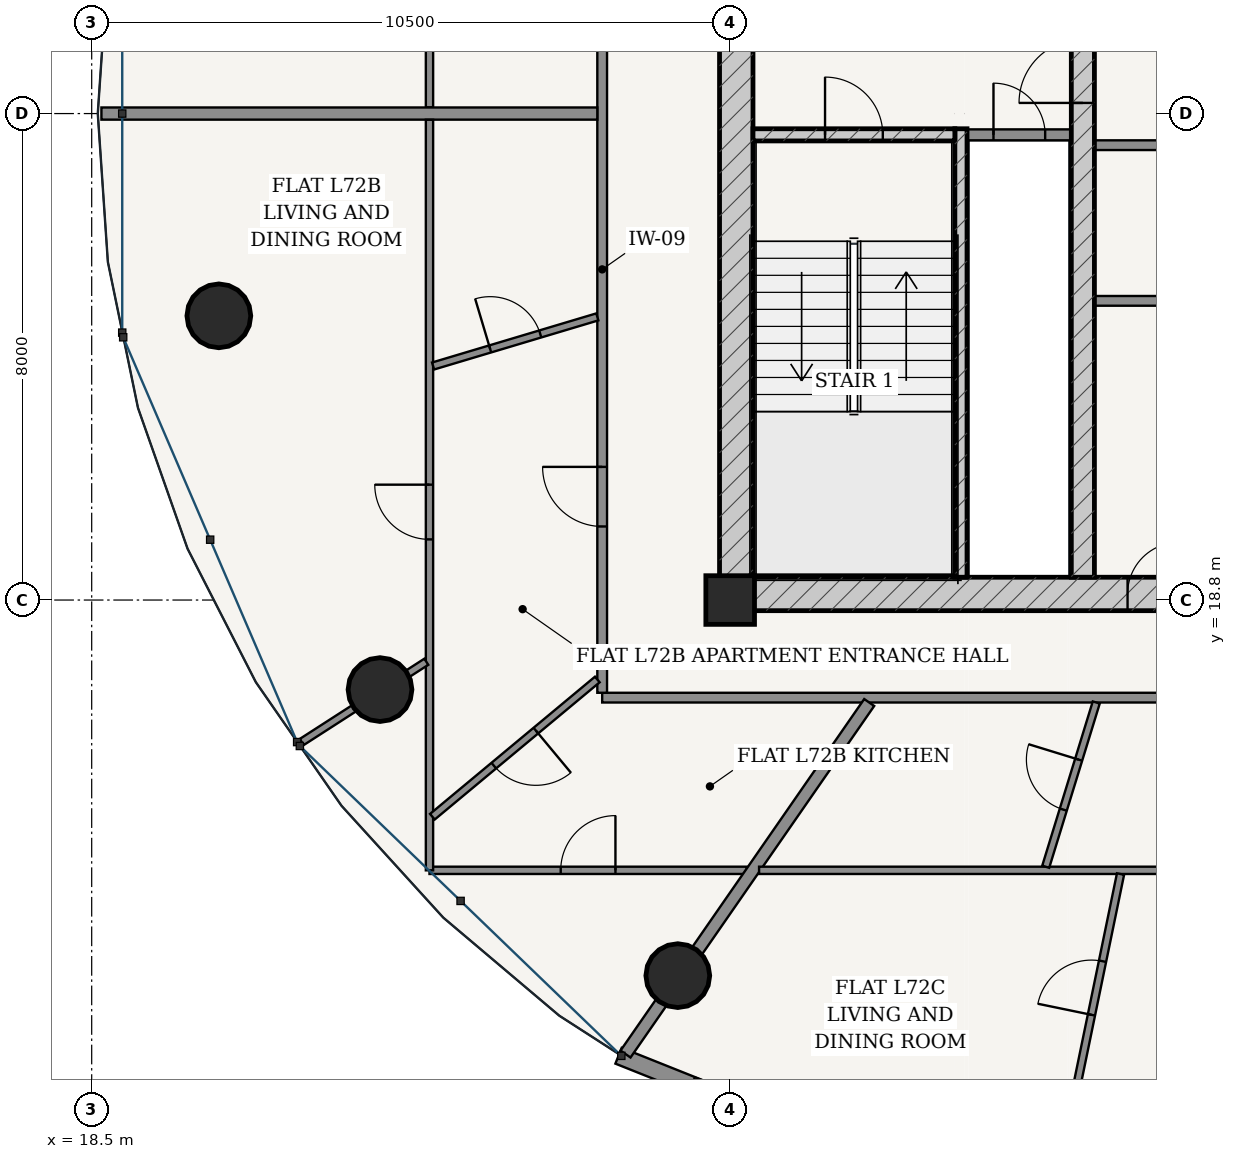
"""IFC4 building model, lengths in metres.
Left out: names, types, materials, properties, quantities, classifications, styles, units other than length and angle.
Written with IfcOpenShell. Run it as: python <this file> out.ifc"""

import sys

from ifc_helpers import new_model, si_unit, direction, frame, frame_2d, origin, origin_2d, place, context, subcontext, project, spatial, rectangle, hollow_circle, extrude, source, transform, mapped, element, fill, save


model = new_model("IFC4")
c1 = context("Model", 3, precision=1e-05, world=origin(), true_north=direction((-0.2419218956, 0.970295726276)))
c2 = subcontext(c1, "Body", "Model", "MODEL_VIEW")
j1 = project(units=[si_unit("LENGTHUNIT", "METRE"), si_unit("PLANEANGLEUNIT", "RADIAN")], contexts=[c1])
p1 = place(None, origin())
s1 = spatial("IfcSite", under=j1, at=p1, CompositionType="ELEMENT")
p2 = place(p1, origin())
s2 = spatial("IfcBuilding", under=s1, at=p2, CompositionType="ELEMENT")
p3 = place(p2, frame((0.0, 0.0, 274.45)))
s3 = spatial("IfcBuildingStorey", under=s2, at=p3, CompositionType="ELEMENT", Elevation=274.45)
p4 = place(p3, frame((29.0, 18.8, 0.0), z_axis=(0.0, 0.0, 1.0), x_axis=(1.0, 0.0, 0.0)))
e1 = element("IfcColumn", 1, at=p4, inside=s3, PredefinedType="COLUMN", context=c2, shape_type="SweptSolid", body=[
    extrude(rectangle(XDim=0.8, YDim=0.8, at=origin_2d()), origin(), (0.0, 0.0, 1.0), 3.75),
])
p5 = place(p3, frame((28.825, 18.9, 0.0), z_axis=(0.0, 0.0, 1.0), x_axis=(1.0, 0.0, 0.0)))
e2 = element("IfcWall", 2, at=p5, inside=s3, PredefinedType="SHEAR", context=c2, shape_type="SweptSolid", body=[
    extrude(rectangle(XDim=18.35, YDim=0.55, at=frame_2d((9.175, 0.0))), origin(), (0.0, 0.0, 1.0), 3.49),
])
p6 = place(p5, frame((6.71, 0.0, 0.0)))
e3 = element("IfcOpeningElement", 3, at=p6, cuts=e2, PredefinedType="OPENING", context=c2, shape_type="SweptSolid", body=[
    extrude(rectangle(XDim=0.85, YDim=2.1, at=frame_2d((0.425, 1.05))), frame((0.0, 0.285, 0.0), z_axis=(0.0, -1.0, 0.0), x_axis=(1.0, 0.0, 0.0)), (0.0, 0.0, 1.0), 0.57),
])
p7 = place(p5, frame((8.75, 0.0, 0.0)))
e4 = element("IfcOpeningElement", 4, at=p7, cuts=e2, PredefinedType="OPENING", context=c2, shape_type="SweptSolid", body=[
    extrude(rectangle(XDim=0.85, YDim=2.1, at=frame_2d((0.425, 1.05))), frame((0.0, 0.285, 0.0), z_axis=(0.0, -1.0, 0.0), x_axis=(1.0, 0.0, 0.0)), (0.0, 0.0, 1.0), 0.57),
])
p8 = place(p5, frame((10.79, 0.0, 0.0)))
e5 = element("IfcOpeningElement", 5, at=p8, cuts=e2, PredefinedType="OPENING", context=c2, shape_type="SweptSolid", body=[
    extrude(rectangle(XDim=0.85, YDim=2.1, at=frame_2d((0.425, 1.05))), frame((0.0, 0.285, 0.0), z_axis=(0.0, -1.0, 0.0), x_axis=(1.0, 0.0, 0.0)), (0.0, 0.0, 1.0), 0.57),
])
p9 = place(p3, frame((29.1, 19.175, 0.0), z_axis=(0.0, 0.0, 1.0), x_axis=(0.0, 1.0, 0.0)))
e6 = element("IfcWall", 6, at=p9, inside=s3, PredefinedType="SHEAR", context=c2, shape_type="SweptSolid", body=[
    extrude(rectangle(XDim=15.25, YDim=0.55, at=frame_2d((7.625, 0.0))), origin(), (0.0, 0.0, 1.0), 3.49),
])
p10 = place(p9, frame((9.875, 0.0, 0.0)))
e7 = element("IfcOpeningElement", 7, at=p10, cuts=e6, PredefinedType="OPENING", context=c2, shape_type="SweptSolid", body=[
    extrude(rectangle(XDim=1.5, YDim=2.2, at=frame_2d((0.75, 1.1))), frame((0.0, 0.285, 0.0), z_axis=(0.0, -1.0, 0.0), x_axis=(1.0, 0.0, 0.0)), (0.0, 0.0, 1.0), 0.57),
])
p11 = place(p3, frame((32.795, 19.175, 0.0), z_axis=(0.0, 0.0, 1.0), x_axis=(0.0, 1.0, 0.0)))
e8 = element("IfcWall", 8, at=p11, inside=s3, PredefinedType="SOLIDWALL", context=c2, shape_type="SweptSolid", body=[
    extrude(rectangle(XDim=7.375, YDim=0.2, at=frame_2d((3.688, 0.0))), origin(), (0.0, 0.0, 1.0), 3.49),
])
p12 = place(p3, frame((29.375, 26.45, 0.0), z_axis=(0.0, 0.0, 1.0), x_axis=(1.0, 0.0, 0.0)))
e9 = element("IfcWall", 9, at=p12, inside=s3, PredefinedType="SOLIDWALL", context=c2, shape_type="SweptSolid", body=[
    extrude(rectangle(XDim=3.32, YDim=0.2, at=frame_2d((1.66, 0.0))), origin(), (0.0, 0.0, 1.0), 3.49),
])
p13 = place(p12, frame((1.185, 0.0, 0.0)))
e10 = element("IfcOpeningElement", 10, at=p13, cuts=e9, PredefinedType="OPENING", context=c2, shape_type="SweptSolid", body=[
    extrude(rectangle(XDim=0.95, YDim=2.15, at=frame_2d((0.475, 1.075))), frame((0.0, 0.11, 0.0), z_axis=(0.0, -1.0, 0.0), x_axis=(1.0, 0.0, 0.0)), (0.0, 0.0, 1.0), 0.22),
])
p14 = place(p3, frame((34.8, 19.175, 0.0), z_axis=(0.0, 0.0, 1.0), x_axis=(0.0, 1.0, 0.0)))
e11 = element("IfcWall", 11, at=p14, inside=s3, PredefinedType="SHEAR", context=c2, shape_type="SweptSolid", body=[
    extrude(rectangle(XDim=15.25, YDim=0.38, at=frame_2d((7.625, 0.0))), origin(), (0.0, 0.0, 1.0), 3.49),
])
p15 = place(p14, frame((7.8, 0.0, 0.0)))
e12 = element("IfcOpeningElement", 12, at=p15, cuts=e11, PredefinedType="OPENING", context=c2, shape_type="SweptSolid", body=[
    extrude(rectangle(XDim=1.05, YDim=2.15, at=frame_2d((0.525, 1.075))), frame((0.0, 0.2, 0.0), z_axis=(0.0, -1.0, 0.0), x_axis=(1.0, 0.0, 0.0)), (0.0, 0.0, 1.0), 0.4),
])
for number, where, z_axis, x_axis in (
    (13, (20.591, 23.474, 0.0), (0.0, 0.0, 1.0), (1.0, 0.0, 0.0)),
    (14, (23.241, 17.328, 0.0), (0.0, 0.0, 1.0), (1.0, 0.0, 0.0)),
    (15, (28.139, 12.624, 0.0), (0.0, 0.0, 1.0), (1.0, 0.0, 0.0)),
):
    element("IfcColumn", number, at=place(p3, frame(where, z_axis=z_axis, x_axis=x_axis)), inside=s3, PredefinedType="COLUMN", context=c2, shape_type="SweptSolid", body=[
        extrude(hollow_circle(Radius=0.525, WallThickness=0.035, at=origin_2d()), origin(), (0.0, 0.0, 1.0), 3.75),
    ])
p16 = place(p3, frame((27.164, 11.306, 0.0), z_axis=(0.0, 0.0, 1.0), x_axis=(0.92871332341, -0.370798547626, 0.0)))
e16 = element("IfcWall", 16, at=p16, inside=s3, PredefinedType="SOLIDWALL", context=c2, shape_type="SweptSolid", body=[
    extrude(rectangle(XDim=7.678, YDim=0.28, at=frame_2d((3.839, 0.0))), origin(), (0.0, 0.0, 1.0), 3.49),
])
p17 = place(p16, frame((1.298, 0.0, 0.85)))
e17 = element("IfcOpeningElement", 17, at=p17, cuts=e16, PredefinedType="OPENING", context=c2, shape_type="SweptSolid", body=[
    extrude(rectangle(XDim=1.55, YDim=1.95, at=frame_2d((0.775, 0.975))), frame((0.0, 0.15, 0.0), z_axis=(0.0, -1.0, 0.0), x_axis=(1.0, 0.0, 0.0)), (0.0, 0.0, 1.0), 0.3),
])
p18 = place(p16, frame((4.83, 0.0, 0.85)))
e18 = element("IfcOpeningElement", 18, at=p18, cuts=e16, PredefinedType="OPENING", context=c2, shape_type="SweptSolid", body=[
    extrude(rectangle(XDim=1.55, YDim=1.95, at=frame_2d((0.775, 0.975))), frame((0.0, 0.15, 0.0), z_axis=(0.0, -1.0, 0.0), x_axis=(1.0, 0.0, 0.0)), (0.0, 0.0, 1.0), 0.3),
])
p19 = place(p3, frame((32.9, 26.45, 0.0), z_axis=(0.0, 0.0, 1.0), x_axis=(1.0, 0.0, 0.0)))
e19 = element("IfcWall", 19, at=p19, inside=s3, PredefinedType="PARTITIONING", context=c2, shape_type="SweptSolid", body=[
    extrude(rectangle(XDim=1.71, YDim=0.18, at=frame_2d((0.855, 0.0))), origin(), (0.0, 0.0, 1.0), 3.49),
])
p20 = place(p19, frame((0.43, 0.0, 0.0)))
e20 = element("IfcOpeningElement", 20, at=p20, cuts=e19, PredefinedType="OPENING", context=c2, shape_type="SweptSolid", body=[
    extrude(rectangle(XDim=0.85, YDim=2.1, at=frame_2d((0.425, 1.05))), frame((0.0, 0.1, 0.0), z_axis=(0.0, -1.0, 0.0), x_axis=(1.0, 0.0, 0.0)), (0.0, 0.0, 1.0), 0.2),
])
p21 = place(p3, frame((34.99, 26.28, 0.0), z_axis=(0.0, 0.0, 1.0), x_axis=(1.0, 0.0, 0.0)))
e21 = element("IfcWall", 21, at=p21, inside=s3, PredefinedType="PARTITIONING", context=c2, shape_type="SweptSolid", body=[
    extrude(rectangle(XDim=6.02, YDim=0.16, at=frame_2d((3.01, 0.0))), origin(), (0.0, 0.0, 1.0), 3.49),
])
p22 = place(p21, frame((1.045, 0.0, 0.0)))
e22 = element("IfcOpeningElement", 22, at=p22, cuts=e21, PredefinedType="OPENING", context=c2, shape_type="SweptSolid", body=[
    extrude(rectangle(XDim=0.85, YDim=2.1, at=frame_2d((0.425, 1.05))), frame((0.0, 0.09, 0.0), z_axis=(0.0, -1.0, 0.0), x_axis=(1.0, 0.0, 0.0)), (0.0, 0.0, 1.0), 0.18),
])
p23 = place(p21, frame((3.215, 0.0, 0.0)))
e23 = element("IfcOpeningElement", 23, at=p23, cuts=e21, PredefinedType="OPENING", context=c2, shape_type="SweptSolid", body=[
    extrude(rectangle(XDim=1.1, YDim=2.2, at=frame_2d((0.55, 1.1))), frame((0.0, 0.09, 0.0), z_axis=(0.0, -1.0, 0.0), x_axis=(1.0, 0.0, 0.0)), (0.0, 0.0, 1.0), 0.18),
])
p24 = place(p21, frame((4.695, 0.0, 0.0)))
e24 = element("IfcOpeningElement", 24, at=p24, cuts=e21, PredefinedType="OPENING", context=c2, shape_type="SweptSolid", body=[
    extrude(rectangle(XDim=1.1, YDim=2.2, at=frame_2d((0.55, 1.1))), frame((0.0, 0.09, 0.0), z_axis=(0.0, -1.0, 0.0), x_axis=(1.0, 0.0, 0.0)), (0.0, 0.0, 1.0), 0.18),
])
p25 = place(p3, frame((34.99, 23.72, 0.0), z_axis=(0.0, 0.0, 1.0), x_axis=(1.0, 0.0, 0.0)))
e25 = element("IfcWall", 25, at=p25, inside=s3, PredefinedType="PARTITIONING", context=c2, shape_type="SweptSolid", body=[
    extrude(rectangle(XDim=6.02, YDim=0.16, at=frame_2d((3.01, 0.0))), origin(), (0.0, 0.0, 1.0), 3.49),
])
p26 = place(p3, frame((26.895, 17.195, 0.0), z_axis=(0.0, 0.0, 1.0), x_axis=(1.0, 0.0, 0.0)))
e26 = element("IfcWall", 26, at=p26, inside=s3, PredefinedType="PARTITIONING", context=c2, shape_type="SweptSolid", body=[
    extrude(rectangle(XDim=22.21, YDim=0.16, at=frame_2d((11.105, 0.0))), origin(), (0.0, 0.0, 1.0), 3.015),
])
p27 = place(p26, frame((9.746, 0.0, 0.0)))
e27 = element("IfcOpeningElement", 27, at=p27, cuts=e26, PredefinedType="OPENING", context=c2, shape_type="SweptSolid", body=[
    extrude(rectangle(XDim=0.98, YDim=2.2, at=frame_2d((0.49, 1.1))), frame((0.0, 0.09, 0.0), z_axis=(0.0, -1.0, 0.0), x_axis=(1.0, 0.0, 0.0)), (0.0, 0.0, 1.0), 0.18),
])
p28 = place(p26, frame((20.864, 0.0, 0.0)))
e28 = element("IfcOpeningElement", 28, at=p28, cuts=e26, PredefinedType="OPENING", context=c2, shape_type="SweptSolid", body=[
    extrude(rectangle(XDim=0.98, YDim=2.2, at=frame_2d((0.49, 1.1))), frame((0.0, 0.09, 0.0), z_axis=(0.0, -1.0, 0.0), x_axis=(1.0, 0.0, 0.0)), (0.0, 0.0, 1.0), 0.18),
])
p29 = place(p3, frame((26.895, 17.275, 0.0), z_axis=(0.0, 0.0, 1.0), x_axis=(0.0, 1.0, 0.0)))
e29 = element("IfcWall", 29, at=p29, inside=s3, PredefinedType="PARTITIONING", context=c2, shape_type="SweptSolid", body=[
    extrude(rectangle(XDim=13.925, YDim=0.16, at=frame_2d((6.962, 0.0))), origin(), (0.0, 0.0, 1.0), 3.015),
])
p30 = place(p29, frame((2.735, 0.0, 0.0)))
e30 = element("IfcOpeningElement", 30, at=p30, cuts=e29, PredefinedType="OPENING", context=c2, shape_type="SweptSolid", body=[
    extrude(rectangle(XDim=0.98, YDim=2.2, at=frame_2d((0.49, 1.1))), frame((0.0, 0.09, 0.0), z_axis=(0.0, -1.0, 0.0), x_axis=(1.0, 0.0, 0.0)), (0.0, 0.0, 1.0), 0.18),
])
p31 = place(p3, frame((24.055, 26.902, 0.0), z_axis=(0.0, 0.0, 1.0), x_axis=(0.0, 1.0, 0.0)))
e31 = element("IfcWall", 31, at=p31, inside=s3, PredefinedType="PARTITIONING", context=c2, shape_type="SweptSolid", body=[
    extrude(rectangle(XDim=7.218, YDim=0.12, at=frame_2d((3.609, 0.0))), origin(), (0.0, 0.0, 1.0), 3.015),
])
p32 = place(p3, frame((26.815, 26.8, 0.0), z_axis=(0.0, 0.0, 1.0), x_axis=(-1.0, 0.0, 0.0)))
e32 = element("IfcWall", 32, at=p32, inside=s3, PredefinedType="PARTITIONING", context=c2, shape_type="SweptSolid", body=[
    extrude(rectangle(XDim=8.155, YDim=0.2, at=frame_2d((4.078, 0.0))), origin(), (0.0, 0.0, 1.0), 3.121),
])
p33 = place(p3, frame((29.271, 14.355, 0.0), z_axis=(0.0, 0.0, 1.0), x_axis=(-1.0, 0.0, 0.0)))
e33 = element("IfcWall", 33, at=p33, inside=s3, PredefinedType="PARTITIONING", context=c2, shape_type="SweptSolid", body=[
    extrude(rectangle(XDim=5.216, YDim=0.12, at=frame_2d((2.608, 0.0))), origin(), (0.0, 0.0, 1.0), 3.015),
])
p34 = place(p33, frame((2.158, 0.0, 0.0)))
e34 = element("IfcOpeningElement", 34, at=p34, cuts=e33, PredefinedType="OPENING", context=c2, shape_type="SweptSolid", body=[
    extrude(rectangle(XDim=0.9, YDim=2.15, at=frame_2d((0.45, 1.075))), frame((0.0, 0.07, 0.0), z_axis=(0.0, -1.0, 0.0), x_axis=(1.0, 0.0, 0.0)), (0.0, 0.0, 1.0), 0.14),
])
p35 = place(p3, frame((24.055, 14.355, 0.0), z_axis=(0.0, 0.0, 1.0), x_axis=(0.0, 1.0, 0.0)))
e35 = element("IfcWall", 35, at=p35, inside=s3, PredefinedType="PARTITIONING", context=c2, shape_type="SweptSolid", body=[
    extrude(rectangle(XDim=12.343, YDim=0.12, at=frame_2d((6.171, 0.0))), origin(), (0.0, 0.0, 1.0), 3.015),
])
p36 = place(p35, frame((5.442, 0.0, 0.0)))
e36 = element("IfcOpeningElement", 36, at=p36, cuts=e35, PredefinedType="OPENING", context=c2, shape_type="SweptSolid", body=[
    extrude(rectangle(XDim=0.9, YDim=2.15, at=frame_2d((0.45, 1.075))), frame((0.0, 0.07, 0.0), z_axis=(0.0, -1.0, 0.0), x_axis=(1.0, 0.0, 0.0)), (0.0, 0.0, 1.0), 0.14),
])
p37 = place(p3, frame((24.003, 17.785, 0.0), z_axis=(0.0, 0.0, 1.0), x_axis=(-0.840715962824, -0.541476379774, 0.0)))
e37 = element("IfcWall", 37, at=p37, inside=s3, PredefinedType="PARTITIONING", context=c2, shape_type="SweptSolid", body=[
    extrude(rectangle(XDim=2.437, YDim=0.12, at=frame_2d((1.219, 0.0))), origin(), (0.0, 0.0, 1.0), 3.015),
])
p38 = place(p3, frame((26.815, 23.456, 0.0), z_axis=(0.0, 0.0, 1.0), x_axis=(-0.958095258025, -0.286449780154, 0.0)))
e38 = element("IfcWall", 38, at=p38, inside=s3, PredefinedType="PARTITIONING", context=c2, shape_type="SweptSolid", body=[
    extrude(rectangle(XDim=2.819, YDim=0.12, at=frame_2d((1.409, 0.0))), origin(), (0.0, 0.0, 1.0), 3.209),
])
p39 = place(p38, frame((0.979, 0.0, 0.0)))
e39 = element("IfcOpeningElement", 39, at=p39, cuts=e38, PredefinedType="OPENING", context=c2, shape_type="SweptSolid", body=[
    extrude(rectangle(XDim=0.86, YDim=2.15, at=frame_2d((0.43, 1.075))), frame((0.0, 0.07, 0.0), z_axis=(0.0, -1.0, 0.0), x_axis=(1.0, 0.0, 0.0)), (0.0, 0.0, 1.0), 0.14),
])
p40 = place(p3, frame((26.815, 17.493, 0.0), z_axis=(0.0, 0.0, 1.0), x_axis=(-0.768708794437, -0.639598928513, 0.0)))
e40 = element("IfcWall", 40, at=p40, inside=s3, PredefinedType="PARTITIONING", context=c2, shape_type="SweptSolid", body=[
    extrude(rectangle(XDim=3.529, YDim=0.12, at=frame_2d((1.764, 0.0))), origin(), (0.0, 0.0, 1.0), 3.121),
])
p41 = place(p40, frame((1.314, 0.0, 0.0)))
e41 = element("IfcOpeningElement", 41, at=p41, cuts=e40, PredefinedType="OPENING", context=c2, shape_type="SweptSolid", body=[
    extrude(rectangle(XDim=0.9, YDim=2.15, at=frame_2d((0.45, 1.075))), frame((0.0, 0.07, 0.0), z_axis=(0.0, -1.0, 0.0), x_axis=(1.0, 0.0, 0.0)), (0.0, 0.0, 1.0), 0.14),
])
p42 = place(p3, frame((31.286, 17.115, 0.0), z_axis=(0.0, 0.0, 1.0), x_axis=(-0.569682734556, -0.821864698079, 0.0)))
e42 = element("IfcWall", 42, at=p42, inside=s3, PredefinedType="PARTITIONING", context=c2, shape_type="SweptSolid", body=[
    extrude(rectangle(XDim=7.034, YDim=0.2, at=frame_2d((3.517, 0.0))), origin(), (0.0, 0.0, 1.0), 3.015),
])
p43 = place(p3, frame((43.246, 14.355, 0.0), z_axis=(0.0, 0.0, 1.0), x_axis=(-1.0, 0.0, 0.0)))
e43 = element("IfcWall", 43, at=p43, inside=s3, PredefinedType="PARTITIONING", context=c2, shape_type="SweptSolid", body=[
    extrude(rectangle(XDim=13.771, YDim=0.12, at=frame_2d((6.885, 0.0))), origin(), (0.0, 0.0, 1.0), 3.015),
])
p44 = place(p43, frame((5.244, 0.0, 0.0)))
e44 = element("IfcOpeningElement", 44, at=p44, cuts=e43, PredefinedType="OPENING", context=c2, shape_type="SweptSolid", body=[
    extrude(rectangle(XDim=0.9, YDim=2.15, at=frame_2d((0.45, 1.075))), frame((0.0, 0.07, 0.0), z_axis=(0.0, -1.0, 0.0), x_axis=(1.0, 0.0, 0.0)), (0.0, 0.0, 1.0), 0.14),
])
p45 = place(p3, frame((35.419, 14.294, 0.0), z_axis=(0.0, 0.0, 1.0), x_axis=(-0.202123253109, -0.979360092383, 0.0)))
e45 = element("IfcWall", 45, at=p45, inside=s3, PredefinedType="PARTITIONING", context=c2, shape_type="SweptSolid", body=[
    extrude(rectangle(XDim=5.858, YDim=0.12, at=frame_2d((2.929, 0.0))), origin(), (0.0, 0.0, 1.0), 3.015),
])
p46 = place(p45, frame((1.464, 0.0, 0.0)))
e46 = element("IfcOpeningElement", 46, at=p46, cuts=e45, PredefinedType="OPENING", context=c2, shape_type="SweptSolid", body=[
    extrude(rectangle(XDim=0.9, YDim=2.15, at=frame_2d((0.45, 1.075))), frame((0.0, 0.07, 0.0), z_axis=(0.0, -1.0, 0.0), x_axis=(1.0, 0.0, 0.0)), (0.0, 0.0, 1.0), 0.14),
])
p47 = place(p3, frame((35.02, 17.115, 0.0), z_axis=(0.0, 0.0, 1.0), x_axis=(-0.294110134522, -0.955771535866, 0.0)))
e47 = element("IfcWall", 47, at=p47, inside=s3, PredefinedType="PARTITIONING", context=c2, shape_type="SweptSolid", body=[
    extrude(rectangle(XDim=2.826, YDim=0.12, at=frame_2d((1.413, 0.0))), origin(), (0.0, 0.0, 1.0), 3.209),
])
p48 = place(p47, frame((0.983, 0.0, 0.0)))
e48 = element("IfcOpeningElement", 48, at=p48, cuts=e47, PredefinedType="OPENING", context=c2, shape_type="SweptSolid", body=[
    extrude(rectangle(XDim=0.86, YDim=2.15, at=frame_2d((0.43, 1.075))), frame((0.0, 0.07, 0.0), z_axis=(0.0, -1.0, 0.0), x_axis=(1.0, 0.0, 0.0)), (0.0, 0.0, 1.0), 0.14),
])
m1 = source(origin(), c2, "Body", "SweptSolid", [
    extrude(rectangle(XDim=1.05, YDim=2.15, at=frame_2d((0.525, 1.075))), frame((0.0, 0.025, 0.0), z_axis=(0.0, -1.0, 0.0), x_axis=(1.0, 0.0, 0.0)), (0.0, 0.0, 1.0), 0.05),
])
p49 = place(p15, origin())
e49 = element("IfcDoor", 49, at=p49, inside=s3, OperationType="SINGLE_SWING_LEFT", PredefinedType="DOOR", context=c2, shape_type="MappedRepresentation", body=[
    mapped(m1, transform((0.0, 0.0, 0.0), scale=1.0)),
])
fill(e12, e49)
m2 = source(origin(), c2, "Body", "SweptSolid", [
    extrude(rectangle(XDim=0.95, YDim=2.15, at=frame_2d((0.475, 1.075))), frame((0.0, 0.025, 0.0), z_axis=(0.0, -1.0, 0.0), x_axis=(1.0, 0.0, 0.0)), (0.0, 0.0, 1.0), 0.05),
])
p50 = place(p13, origin())
e50 = element("IfcDoor", 50, at=p50, inside=s3, OperationType="SINGLE_SWING_LEFT", PredefinedType="DOOR", context=c2, shape_type="MappedRepresentation", body=[
    mapped(m2, transform((0.0, 0.0, 0.0), scale=1.0)),
])
fill(e10, e50)
m3 = source(origin(), c2, "Body", "SweptSolid", [
    extrude(rectangle(XDim=0.85, YDim=2.1, at=frame_2d((0.425, 1.05))), frame((0.0, 0.025, 0.0), z_axis=(0.0, -1.0, 0.0), x_axis=(1.0, 0.0, 0.0)), (0.0, 0.0, 1.0), 0.05),
])
p51 = place(p20, origin())
e51 = element("IfcDoor", 51, at=p51, inside=s3, OperationType="SINGLE_SWING_LEFT", PredefinedType="DOOR", context=c2, shape_type="MappedRepresentation", body=[
    mapped(m3, transform((0.0, 0.0, 0.0), scale=1.0)),
])
fill(e20, e51)
p52 = place(p6, origin())
e52 = element("IfcDoor", 52, at=p52, inside=s3, OperationType="SINGLE_SWING_RIGHT", PredefinedType="DOOR", context=c2, shape_type="MappedRepresentation", body=[
    mapped(m3, transform((0.0, 0.0, 0.0), scale=1.0)),
])
fill(e3, e52)
m4 = source(origin(), c2, "Body", "SweptSolid", [
    extrude(rectangle(XDim=0.98, YDim=2.2, at=frame_2d((0.49, 1.1))), frame((0.0, 0.025, 0.0), z_axis=(0.0, -1.0, 0.0), x_axis=(1.0, 0.0, 0.0)), (0.0, 0.0, 1.0), 0.05),
])
p53 = place(p30, origin())
e53 = element("IfcDoor", 53, at=p53, inside=s3, OperationType="SINGLE_SWING_RIGHT", PredefinedType="DOOR", context=c2, shape_type="MappedRepresentation", body=[
    mapped(m4, transform((0.0, 0.0, 0.0), scale=1.0)),
])
fill(e30, e53)
m5 = source(origin(), c2, "Body", "SweptSolid", [
    extrude(rectangle(XDim=0.86, YDim=2.15, at=frame_2d((0.43, 1.075))), frame((0.0, 0.025, 0.0), z_axis=(0.0, -1.0, 0.0), x_axis=(1.0, 0.0, 0.0)), (0.0, 0.0, 1.0), 0.05),
])
p54 = place(p39, frame((0.86, 0.0, 0.0), z_axis=(0.0, 0.0, 1.0), x_axis=(-1.0, 0.0, 0.0)))
e54 = element("IfcDoor", 54, at=p54, inside=s3, OperationType="SINGLE_SWING_LEFT", PredefinedType="DOOR", context=c2, shape_type="MappedRepresentation", body=[
    mapped(m5, transform((0.0, 0.0, 0.0), scale=1.0)),
])
fill(e39, e54)
m6 = source(origin(), c2, "Body", "SweptSolid", [
    extrude(rectangle(XDim=0.9, YDim=2.15, at=frame_2d((0.45, 1.075))), frame((0.0, 0.025, 0.0), z_axis=(0.0, -1.0, 0.0), x_axis=(1.0, 0.0, 0.0)), (0.0, 0.0, 1.0), 0.05),
])
p55 = place(p36, origin())
e55 = element("IfcDoor", 55, at=p55, inside=s3, OperationType="SINGLE_SWING_RIGHT", PredefinedType="DOOR", context=c2, shape_type="MappedRepresentation", body=[
    mapped(m6, transform((0.0, 0.0, 0.0), scale=1.0)),
])
fill(e36, e55)
p56 = place(p41, origin())
e56 = element("IfcDoor", 56, at=p56, inside=s3, OperationType="SINGLE_SWING_LEFT", PredefinedType="DOOR", context=c2, shape_type="MappedRepresentation", body=[
    mapped(m6, transform((0.0, 0.0, 0.0), scale=1.0)),
])
fill(e41, e56)
p57 = place(p34, frame((0.9, 0.0, 0.0), z_axis=(0.0, 0.0, 1.0), x_axis=(-1.0, 0.0, 0.0)))
e57 = element("IfcDoor", 57, at=p57, inside=s3, OperationType="SINGLE_SWING_RIGHT", PredefinedType="DOOR", context=c2, shape_type="MappedRepresentation", body=[
    mapped(m6, transform((0.0, 0.0, 0.0), scale=1.0)),
])
fill(e34, e57)
p58 = place(p48, frame((0.86, 0.0, 0.0), z_axis=(0.0, 0.0, 1.0), x_axis=(-1.0, 0.0, 0.0)))
e58 = element("IfcDoor", 58, at=p58, inside=s3, OperationType="SINGLE_SWING_RIGHT", PredefinedType="DOOR", context=c2, shape_type="MappedRepresentation", body=[
    mapped(m5, transform((0.0, 0.0, 0.0), scale=1.0)),
])
fill(e48, e58)
p59 = place(p46, frame((0.9, 0.0, 0.0), z_axis=(0.0, 0.0, 1.0), x_axis=(-1.0, 0.0, 0.0)))
e59 = element("IfcDoor", 59, at=p59, inside=s3, OperationType="SINGLE_SWING_LEFT", PredefinedType="DOOR", context=c2, shape_type="MappedRepresentation", body=[
    mapped(m6, transform((0.0, 0.0, 0.0), scale=1.0)),
])
fill(e46, e59)
save(model, sys.argv[1])
